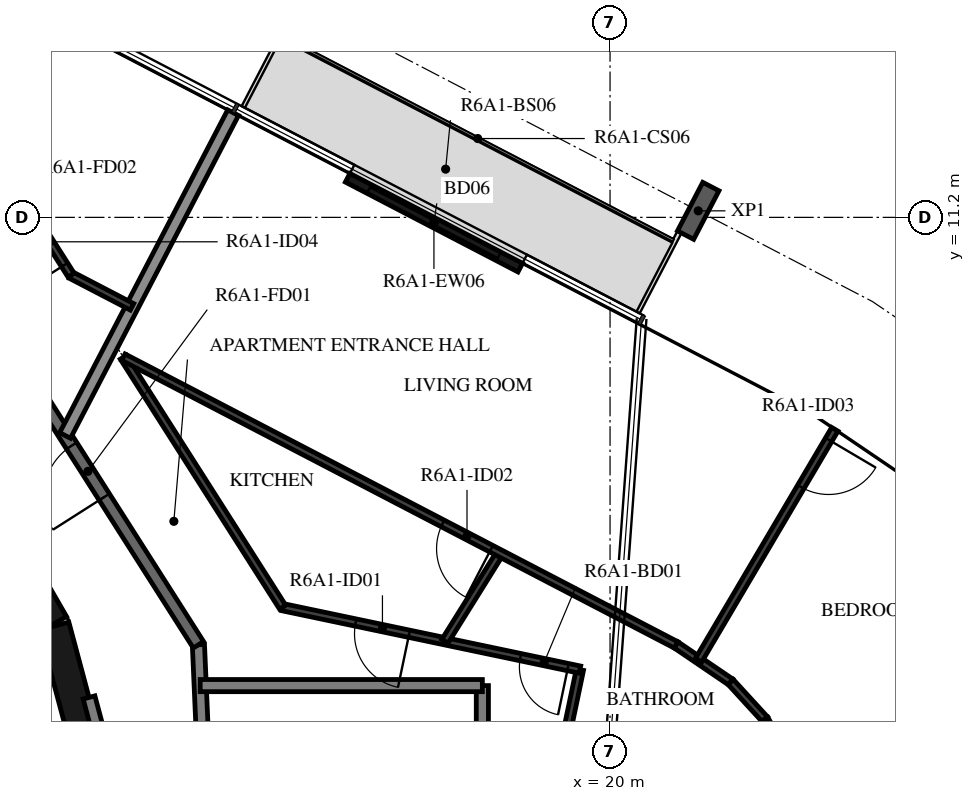
"""IFC4 building model, lengths in metres.
Left out: names, types, materials, properties, quantities, classifications, styles, units other than length and angle.
Written with IfcOpenShell. Run it as: python <this file> out.ifc"""

import sys

from ifc_helpers import new_model, si_unit, direction, frame, frame_2d, origin, origin_2d, place, context, subcontext, project, spatial, rectangle, i_section, extrude, element, fill, save


model = new_model("IFC4")
c1 = context("Model", 3, precision=1e-05, world=origin(), true_north=direction((0.0, 1.0)))
c2 = subcontext(c1, "Body", "Model", "MODEL_VIEW")
j1 = project(units=[si_unit("LENGTHUNIT", "METRE"), si_unit("PLANEANGLEUNIT", "RADIAN")], contexts=[c1])
p1 = place(None, origin())
s1 = spatial("IfcSite", under=j1, at=p1, CompositionType="ELEMENT")
p2 = place(p1, origin())
s2 = spatial("IfcBuilding", under=s1, at=p2, CompositionType="ELEMENT")
p3 = place(p2, frame((0.0, 0.0, 230.2)))
s3 = spatial("IfcBuildingStorey", under=s2, at=p3, CompositionType="ELEMENT", Elevation=230.2)
p4 = place(p3, frame((21.45, 11.308, -0.38), z_axis=(0.0, 0.0, 1.0), x_axis=(0.887010710334, -0.461748849216, 0.0)))
e1 = element("IfcColumn", 1, at=p4, inside=s3, PredefinedType="COLUMN", context=c2, shape_type="SweptSolid", body=[
    extrude(i_section(OverallWidth=0.3, OverallDepth=0.9, WebThickness=0.019, FlangeThickness=0.035, FilletRadius=0.03, at=origin_2d()), origin(), (0.0, 0.0, 1.0), 3.5),
])
p5 = place(p3, frame((18.523, 10.374, 0.0), z_axis=(0.0, 0.0, 1.0), x_axis=(-0.887014349583, 0.461741858221, 0.0)))
e2 = element("IfcWall", 2, at=p5, inside=s3, PredefinedType="STANDARD", context=c2, shape_type="SweptSolid", body=[
    extrude(rectangle(XDim=3.2, YDim=0.16, at=frame_2d((1.6, 0.0))), origin(), (0.0, 0.0, 1.0), 3.12),
])
p6 = place(p5, frame((0.4, 0.0, 0.0)))
e3 = element("IfcOpeningElement", 3, at=p6, cuts=e2, PredefinedType="OPENING", context=c2, shape_type="SweptSolid", body=[
    extrude(rectangle(XDim=2.4, YDim=2.4, at=frame_2d((1.2, 1.2))), frame((0.0, 0.09, 0.0), z_axis=(0.0, -1.0, 0.0), x_axis=(1.0, 0.0, 0.0)), (0.0, 0.0, 1.0), 0.18),
])
for number, where, z_axis, x_axis in (
    (4, (11.643, 1.55, 0.0), (0.0, 0.0, 1.0), (-0.259, 0.966, 0.0)),
    (5, (10.845, 4.51, 0.0), (0.0, 0.0, 1.0), (-0.5, 0.866, 0.0)),
):
    element("IfcWall", number, at=place(p3, frame(where, z_axis=z_axis, x_axis=x_axis)), inside=s3, PredefinedType="SHEAR", context=c2, shape_type="SweptSolid", body=[
        extrude(rectangle(XDim=3.033, YDim=0.5, at=frame_2d((1.516, 0.0))), origin(), (0.0, 0.0, 1.0), 3.12),
    ])
p7 = place(p3, frame((11.87, 1.668, 0.0), z_axis=(0.0, 0.0, 1.0), x_axis=(-0.258836880648, 0.965921047093, 0.0)))
e6 = element("IfcWall", 6, at=p7, inside=s3, PredefinedType="STANDARD", context=c2, shape_type="SweptSolid", body=[
    extrude(rectangle(XDim=1.695, YDim=0.2, at=frame_2d((0.848, 0.0))), origin(), (0.0, 0.0, 1.0), 3.12),
])
p8 = place(p3, frame((13.331, 1.874, 0.0), z_axis=(0.0, 0.0, 1.0), x_axis=(-0.043621457762, 0.999048131184, 0.0)))
e7 = element("IfcWall", 7, at=p8, inside=s3, PredefinedType="STANDARD", context=c2, shape_type="SweptSolid", body=[
    extrude(rectangle(XDim=2.3, YDim=0.2, at=frame_2d((1.15, 0.0))), origin(), (0.0, 0.0, 1.0), 3.12),
])
p9 = place(p3, frame((13.231, 4.172, 0.0), z_axis=(0.0, 0.0, 1.0), x_axis=(-0.537304397561, 0.843388394728, 0.0)))
e8 = element("IfcWall", 8, at=p9, inside=s3, PredefinedType="STANDARD", context=c2, shape_type="SweptSolid", body=[
    extrude(rectangle(XDim=7.181, YDim=0.2, at=frame_2d((3.59, 0.0))), origin(), (0.0, 0.0, 1.0), 3.12),
])
p10 = place(p9, frame((2.881, 0.0, 0.0)))
e9 = element("IfcOpeningElement", 9, at=p10, cuts=e8, PredefinedType="OPENING", context=c2, shape_type="SweptSolid", body=[
    extrude(rectangle(XDim=1.0, YDim=2.1, at=frame_2d((0.5, 1.05))), frame((0.0, 0.11, 0.0), z_axis=(0.0, -1.0, 0.0), x_axis=(1.0, 0.0, 0.0)), (0.0, 0.0, 1.0), 0.22),
])
p11 = place(p9, frame((5.681, 0.0, 0.0)))
e10 = element("IfcOpeningElement", 10, at=p11, cuts=e8, PredefinedType="OPENING", context=c2, shape_type="SweptSolid", body=[
    extrude(rectangle(XDim=1.0, YDim=2.1, at=frame_2d((0.5, 1.05))), frame((0.0, 0.11, 0.0), z_axis=(0.0, -1.0, 0.0), x_axis=(1.0, 0.0, 0.0)), (0.0, 0.0, 1.0), 0.22),
])
p12 = place(p3, frame((17.9, -1.772, 0.0), z_axis=(0.0, 0.0, 1.0), x_axis=(0.0, 1.0, 0.0)))
e11 = element("IfcWall", 11, at=p12, inside=s3, PredefinedType="STANDARD", context=c2, shape_type="SweptSolid", body=[
    extrude(rectangle(XDim=5.272, YDim=0.2, at=frame_2d((2.636, 0.0))), origin(), (0.0, 0.0, 1.0), 3.12),
])
p13 = place(p3, frame((17.9, 3.5, 0.0), z_axis=(0.0, 0.0, 1.0), x_axis=(-1.0, 0.0, 0.0)))
e12 = element("IfcWall", 12, at=p13, inside=s3, PredefinedType="STANDARD", context=c2, shape_type="SweptSolid", body=[
    extrude(rectangle(XDim=4.64, YDim=0.2, at=frame_2d((2.32, 0.0))), origin(), (0.0, 0.0, 1.0), 3.12),
])
p14 = place(p3, frame((13.801, 12.922, 0.0), z_axis=(0.0, 0.0, 1.0), x_axis=(-0.461726485624, -0.887022351733, 0.0)))
e13 = element("IfcWall", 13, at=p14, inside=s3, PredefinedType="STANDARD", context=c2, shape_type="SweptSolid", body=[
    extrude(rectangle(XDim=5.984, YDim=0.2, at=frame_2d((2.992, 0.0))), origin(), (0.0, 0.0, 1.0), 2.73),
])
p15 = place(p3, frame((19.199, 2.308, 0.0), z_axis=(0.0, 0.0, 1.0), x_axis=(0.205580140246, 0.978640284239, 0.0)))
e14 = element("IfcWall", 14, at=p15, inside=s3, PredefinedType="PARTITIONING", context=c2, shape_type="SweptSolid", body=[
    extrude(rectangle(XDim=1.487, YDim=0.12, at=frame_2d((0.743, 0.0))), origin(), (0.0, 0.0, 1.0), 3.12),
])
p16 = place(p3, frame((19.505, 3.763, 0.0), z_axis=(0.0, 0.0, 1.0), x_axis=(-0.978660081285, 0.205485876157, 0.0)))
e15 = element("IfcWall", 15, at=p16, inside=s3, PredefinedType="PARTITIONING", context=c2, shape_type="SweptSolid", body=[
    extrude(rectangle(XDim=4.996, YDim=0.12, at=frame_2d((2.498, 0.0))), origin(), (0.0, 0.0, 1.0), 3.12),
])
p17 = place(p16, frame((0.2, 0.0, 0.0)))
e16 = element("IfcOpeningElement", 16, at=p17, cuts=e15, PredefinedType="OPENING", context=c2, shape_type="SweptSolid", body=[
    extrude(rectangle(XDim=0.8, YDim=2.1, at=frame_2d((0.4, 1.05))), frame((0.0, 0.07, 0.0), z_axis=(0.0, -1.0, 0.0), x_axis=(1.0, 0.0, 0.0)), (0.0, 0.0, 1.0), 0.14),
])
p18 = place(p16, frame((2.869, 0.0, 0.0)))
e17 = element("IfcOpeningElement", 17, at=p18, cuts=e15, PredefinedType="OPENING", context=c2, shape_type="SweptSolid", body=[
    extrude(rectangle(XDim=0.9, YDim=2.1, at=frame_2d((0.45, 1.05))), frame((0.0, 0.07, 0.0), z_axis=(0.0, -1.0, 0.0), x_axis=(1.0, 0.0, 0.0)), (0.0, 0.0, 1.0), 0.14),
])
p19 = place(p3, frame((14.615, 4.79, 0.0), z_axis=(0.0, 0.0, 1.0), x_axis=(-0.537312928062, 0.843382960071, 0.0)))
e18 = element("IfcWall", 18, at=p19, inside=s3, PredefinedType="PARTITIONING", context=c2, shape_type="SweptSolid", body=[
    extrude(rectangle(XDim=4.875, YDim=0.12, at=frame_2d((2.437, 0.0))), origin(), (0.0, 0.0, 1.0), 3.12),
])
p20 = place(p3, frame((21.085, 4.169, 0.0), z_axis=(0.0, 0.0, 1.0), x_axis=(0.827390024541, -0.561627765776, 0.0)))
e19 = element("IfcWall", 19, at=p20, inside=s3, PredefinedType="PARTITIONING", context=c2, shape_type="SweptSolid", body=[
    extrude(rectangle(XDim=1.087, YDim=0.12, at=frame_2d((0.543, 0.0))), origin(), (0.0, 0.0, 1.0), 3.12),
])
p21 = place(p3, frame((21.984, 3.559, 0.0), z_axis=(0.0, 0.0, 1.0), x_axis=(0.675497816835, -0.737361986715, 0.0)))
e20 = element("IfcWall", 20, at=p21, inside=s3, PredefinedType="PARTITIONING", context=c2, shape_type="SweptSolid", body=[
    extrude(rectangle(XDim=0.829, YDim=0.12, at=frame_2d((0.415, 0.0))), origin(), (0.0, 0.0, 1.0), 3.12),
])
p22 = place(p3, frame((22.544, 2.948, 0.0), z_axis=(0.0, 0.0, 1.0), x_axis=(0.487392269075, -0.873183128585, 0.0)))
e21 = element("IfcWall", 21, at=p22, inside=s3, PredefinedType="PARTITIONING", context=c2, shape_type="SweptSolid", body=[
    extrude(rectangle(XDim=0.829, YDim=0.12, at=frame_2d((0.415, 0.0))), origin(), (0.0, 0.0, 1.0), 3.12),
])
p23 = place(p3, frame((23.696, 7.715, 0.0), z_axis=(0.0, 0.0, 1.0), x_axis=(-0.508219920645, -0.861227329025, 0.0)))
e22 = element("IfcWall", 22, at=p23, inside=s3, PredefinedType="PARTITIONING", context=c2, shape_type="SweptSolid", body=[
    extrude(rectangle(XDim=4.409, YDim=0.12, at=frame_2d((2.205, 0.0))), origin(), (0.0, 0.0, 1.0), 3.12),
])
p24 = place(p23, frame((0.2, 0.0, 0.0)))
e23 = element("IfcOpeningElement", 23, at=p24, cuts=e22, PredefinedType="OPENING", context=c2, shape_type="SweptSolid", body=[
    extrude(rectangle(XDim=0.9, YDim=2.1, at=frame_2d((0.45, 1.05))), frame((0.0, 0.07, 0.0), z_axis=(0.0, -1.0, 0.0), x_axis=(1.0, 0.0, 0.0)), (0.0, 0.0, 1.0), 0.14),
])
p25 = place(p3, frame((18.189, 5.677, 0.0), z_axis=(0.0, 0.0, 1.0), x_axis=(-0.529639004581, -0.848223157445, 0.0)))
e24 = element("IfcWall", 24, at=p25, inside=s3, PredefinedType="PARTITIONING", context=c2, shape_type="SweptSolid", body=[
    extrude(rectangle(XDim=1.707, YDim=0.12, at=frame_2d((0.854, 0.0))), origin(), (0.0, 0.0, 1.0), 3.12),
])
p26 = place(p3, frame((21.085, 4.169, 0.0), z_axis=(0.0, 0.0, 1.0), x_axis=(-0.887017373034, 0.461736050071, 0.0)))
e25 = element("IfcWall", 25, at=p26, inside=s3, PredefinedType="PARTITIONING", context=c2, shape_type="SweptSolid", body=[
    extrude(rectangle(XDim=10.247, YDim=0.12, at=frame_2d((5.123, 0.0))), origin(), (0.0, 0.0, 1.0), 3.12),
])
p27 = place(p26, frame((3.425, 0.0, 0.0)))
e26 = element("IfcOpeningElement", 26, at=p27, cuts=e25, PredefinedType="OPENING", context=c2, shape_type="SweptSolid", body=[
    extrude(rectangle(XDim=0.9, YDim=2.1, at=frame_2d((0.45, 1.05))), frame((0.0, 0.07, 0.0), z_axis=(0.0, -1.0, 0.0), x_axis=(1.0, 0.0, 0.0)), (0.0, 0.0, 1.0), 0.14),
])
p28 = place(p3, frame((12.139, 9.729, 0.0), z_axis=(0.0, 0.0, 1.0), x_axis=(-0.887046876331, 0.461679368383, 0.0)))
e27 = element("IfcWall", 27, at=p28, inside=s3, PredefinedType="PARTITIONING", context=c2, shape_type="SweptSolid", body=[
    extrude(rectangle(XDim=1.13, YDim=0.12, at=frame_2d((0.565, 0.0))), origin(), (0.0, 0.0, 1.0), 3.12),
])
p29 = place(p3, frame((11.137, 10.25, 0.0), z_axis=(0.0, 0.0, 1.0), x_axis=(-0.537231369635, 0.843434914786, 0.0)))
e28 = element("IfcWall", 28, at=p29, inside=s3, PredefinedType="PARTITIONING", context=c2, shape_type="SweptSolid", body=[
    extrude(rectangle(XDim=1.332, YDim=0.12, at=frame_2d((0.666, 0.0))), origin(), (0.0, 0.0, 1.0), 3.12),
])
p30 = place(p29, frame((0.2, 0.0, 0.0)))
e29 = element("IfcOpeningElement", 29, at=p30, cuts=e28, PredefinedType="OPENING", context=c2, shape_type="SweptSolid", body=[
    extrude(rectangle(XDim=0.9, YDim=2.1, at=frame_2d((0.45, 1.05))), frame((0.0, 0.07, 0.0), z_axis=(0.0, -1.0, 0.0), x_axis=(1.0, 0.0, 0.0)), (0.0, 0.0, 1.0), 0.14),
])
p31 = place(p6, origin())
e30 = element("IfcDoor", 30, at=p31, inside=s3, OperationType="DOUBLE_DOOR_SLIDING", PredefinedType="DOOR", context=c2, shape_type="SweptSolid", body=[
    extrude(rectangle(XDim=2.4, YDim=2.4, at=frame_2d((1.2, 1.2))), frame((0.0, 0.025, 0.0), z_axis=(0.0, -1.0, 0.0), x_axis=(1.0, 0.0, 0.0)), (0.0, 0.0, 1.0), 0.05),
])
fill(e3, e30)
p32 = place(p10, origin())
e31 = element("IfcDoor", 31, at=p32, inside=s3, OperationType="SINGLE_SWING_LEFT", PredefinedType="DOOR", context=c2, shape_type="SweptSolid", body=[
    extrude(rectangle(XDim=1.0, YDim=2.1, at=frame_2d((0.5, 1.05))), frame((0.0, 0.025, 0.0), z_axis=(0.0, -1.0, 0.0), x_axis=(1.0, 0.0, 0.0)), (0.0, 0.0, 1.0), 0.05),
])
fill(e9, e31)
p33 = place(p17, origin())
e32 = element("IfcDoor", 32, at=p33, inside=s3, OperationType="SINGLE_SWING_LEFT", PredefinedType="DOOR", context=c2, shape_type="SweptSolid", body=[
    extrude(rectangle(XDim=0.8, YDim=2.1, at=frame_2d((0.4, 1.05))), frame((0.0, 0.025, 0.0), z_axis=(0.0, -1.0, 0.0), x_axis=(1.0, 0.0, 0.0)), (0.0, 0.0, 1.0), 0.05),
])
fill(e16, e32)
p34 = place(p18, origin())
e33 = element("IfcDoor", 33, at=p34, inside=s3, OperationType="SINGLE_SWING_LEFT", PredefinedType="DOOR", context=c2, shape_type="SweptSolid", body=[
    extrude(rectangle(XDim=0.9, YDim=2.1, at=frame_2d((0.45, 1.05))), frame((0.0, 0.025, 0.0), z_axis=(0.0, -1.0, 0.0), x_axis=(1.0, 0.0, 0.0)), (0.0, 0.0, 1.0), 0.05),
])
fill(e17, e33)
p35 = place(p27, origin())
e34 = element("IfcDoor", 34, at=p35, inside=s3, OperationType="SINGLE_SWING_LEFT", PredefinedType="DOOR", context=c2, shape_type="SweptSolid", body=[
    extrude(rectangle(XDim=0.9, YDim=2.1, at=frame_2d((0.45, 1.05))), frame((0.0, 0.025, 0.0), z_axis=(0.0, -1.0, 0.0), x_axis=(1.0, 0.0, 0.0)), (0.0, 0.0, 1.0), 0.05),
])
fill(e26, e34)
p36 = place(p24, origin())
e35 = element("IfcDoor", 35, at=p36, inside=s3, OperationType="SINGLE_SWING_LEFT", PredefinedType="DOOR", context=c2, shape_type="SweptSolid", body=[
    extrude(rectangle(XDim=0.9, YDim=2.1, at=frame_2d((0.45, 1.05))), frame((0.0, 0.025, 0.0), z_axis=(0.0, -1.0, 0.0), x_axis=(1.0, 0.0, 0.0)), (0.0, 0.0, 1.0), 0.05),
])
fill(e23, e35)
p37 = place(p30, origin())
e36 = element("IfcDoor", 36, at=p37, inside=s3, OperationType="SINGLE_SWING_LEFT", PredefinedType="DOOR", context=c2, shape_type="SweptSolid", body=[
    extrude(rectangle(XDim=0.9, YDim=2.1, at=frame_2d((0.45, 1.05))), frame((0.0, 0.025, 0.0), z_axis=(0.0, -1.0, 0.0), x_axis=(1.0, 0.0, 0.0)), (0.0, 0.0, 1.0), 0.05),
])
fill(e29, e36)
save(model, sys.argv[1])
